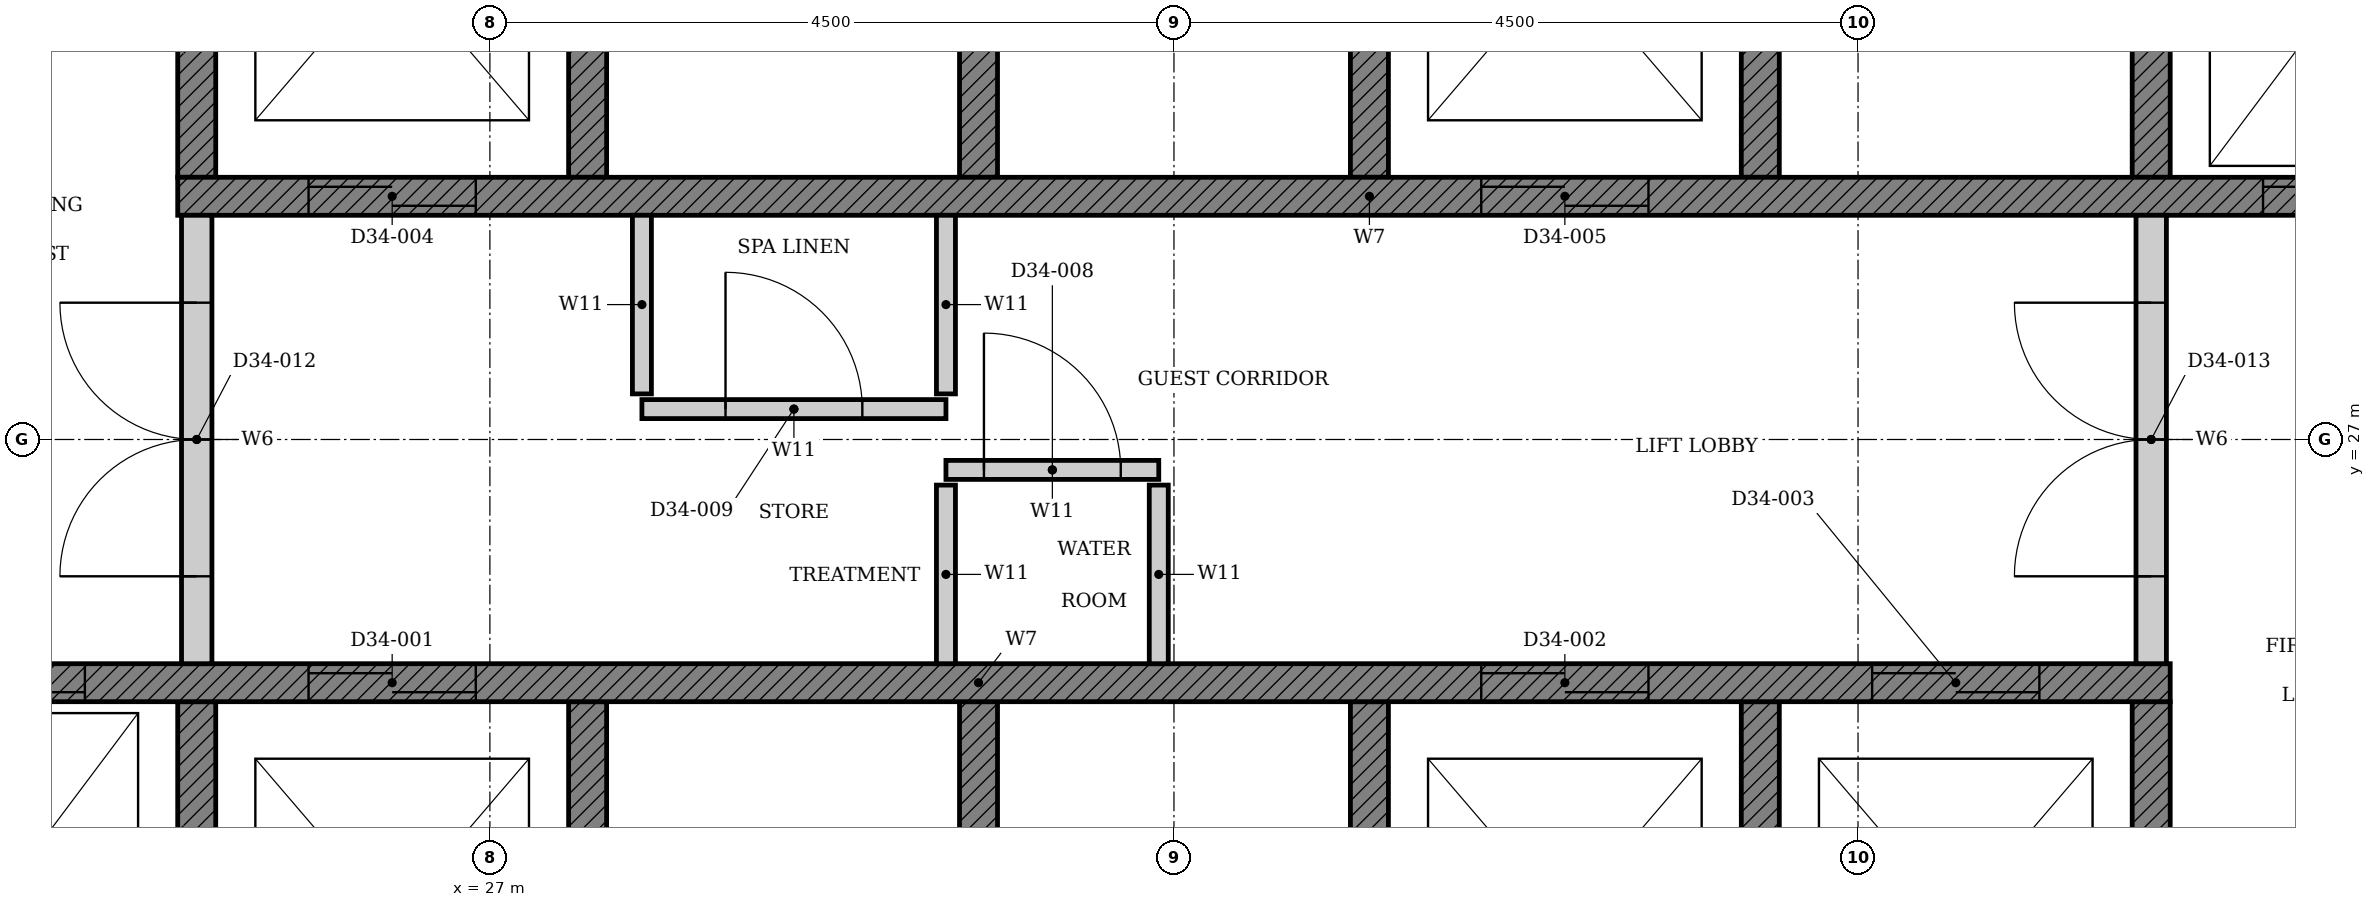
"""IFC4 building model, lengths in metres.
Left out: names, types, materials, properties, quantities, classifications, styles, units other than length and angle.
Written with IfcOpenShell. Run it as: python <this file> out.ifc"""

import sys

from ifc_helpers import new_model, si_unit, direction, frame, frame_2d, origin, place, context, subcontext, project, spatial, polyline, rectangle, outline, extrude, element, fill, save


model = new_model("IFC4")
c1 = context("Model", 3, precision=1e-05, world=origin(), true_north=direction((0.0, 1.0)))
c2 = subcontext(c1, "Body", "Model", "MODEL_VIEW")
j1 = project(units=[si_unit("LENGTHUNIT", "METRE"), si_unit("PLANEANGLEUNIT", "RADIAN")], contexts=[c1])
p1 = place(None, origin())
s1 = spatial("IfcSite", under=j1, at=p1, CompositionType="ELEMENT")
p2 = place(p1, origin())
s2 = spatial("IfcBuilding", under=s1, at=p2, CompositionType="ELEMENT")
p3 = place(p2, frame((0.0, 0.0, 136.8)))
s3 = spatial("IfcBuildingStorey", under=s2, at=p3, CompositionType="ELEMENT", Elevation=136.8)
p4 = place(p3, origin())
e1 = element("IfcWall", 1, at=p4, inside=s3, PredefinedType="SHEAR", context=c2, shape_type="SweptSolid", body=[
    extrude(outline(polyline([(22.375, 22.35), (38.053, 22.35), (38.053, 25.275), (37.803, 25.275), (37.803, 22.65), (35.482, 22.65), (35.482, 25.275), (35.232, 25.275), (35.232, 22.65), (32.911, 22.65), (32.911, 25.275), (32.661, 25.275), (32.661, 22.65), (30.339, 22.65), (30.339, 25.275), (30.089, 25.275), (30.089, 22.65), (27.768, 22.65), (27.768, 25.275), (27.518, 25.275), (27.518, 22.65), (25.197, 22.65), (25.197, 25.275), (24.947, 25.275), (24.947, 22.65), (22.625, 22.65), (22.625, 25.275), (22.375, 25.275), (22.375, 22.35)])), origin(), (0.0, 0.0, 1.0), 3.2),
])
p5 = place(p3, origin())
e2 = element("IfcWall", 2, at=p5, inside=s3, PredefinedType="SHEAR", context=c2, shape_type="SweptSolid", body=[
    extrude(outline(polyline([(24.947, 28.725), (25.197, 28.725), (25.197, 31.35), (27.518, 31.35), (27.518, 28.725), (27.768, 28.725), (27.768, 31.35), (30.089, 31.35), (30.089, 28.725), (30.339, 28.725), (30.339, 31.35), (32.661, 31.35), (32.661, 28.725), (32.911, 28.725), (32.911, 31.35), (35.232, 31.35), (35.232, 28.725), (35.482, 28.725), (35.482, 31.35), (37.803, 31.35), (37.803, 28.725), (38.053, 28.725), (38.053, 31.35), (40.375, 31.35), (40.375, 28.725), (40.625, 28.725), (40.625, 31.65), (24.947, 31.65), (24.947, 28.725)])), origin(), (0.0, 0.0, 1.0), 3.2),
])
p6 = place(p3, frame((22.375, 25.4, 0.0), z_axis=(0.0, 0.0, 1.0), x_axis=(1.0, 0.0, 0.0)))
e3 = element("IfcWall", 3, at=p6, inside=s3, PredefinedType="SHEAR", context=c2, shape_type="SweptSolid", body=[
    extrude(rectangle(XDim=15.678, YDim=0.25, at=frame_2d((7.839, 0.0))), origin(), (0.0, 0.0, 1.0), 3.2),
])
p7 = place(p6, frame((3.432, 0.0, 0.0)))
e4 = element("IfcOpeningElement", 4, at=p7, cuts=e3, PredefinedType="OPENING", context=c2, shape_type="SweptSolid", body=[
    extrude(rectangle(XDim=1.1, YDim=2.1, at=frame_2d((0.55, 1.05))), frame((0.0, 0.135, 0.0), z_axis=(0.0, -1.0, 0.0), x_axis=(1.0, 0.0, 0.0)), (0.0, 0.0, 1.0), 0.27),
])
p8 = place(p6, frame((11.146, 0.0, 0.0)))
e5 = element("IfcOpeningElement", 5, at=p8, cuts=e3, PredefinedType="OPENING", context=c2, shape_type="SweptSolid", body=[
    extrude(rectangle(XDim=1.1, YDim=2.1, at=frame_2d((0.55, 1.05))), frame((0.0, 0.135, 0.0), z_axis=(0.0, -1.0, 0.0), x_axis=(1.0, 0.0, 0.0)), (0.0, 0.0, 1.0), 0.27),
])
p9 = place(p6, frame((13.718, 0.0, 0.0)))
e6 = element("IfcOpeningElement", 6, at=p9, cuts=e3, PredefinedType="OPENING", context=c2, shape_type="SweptSolid", body=[
    extrude(rectangle(XDim=1.1, YDim=2.1, at=frame_2d((0.55, 1.05))), frame((0.0, 0.135, 0.0), z_axis=(0.0, -1.0, 0.0), x_axis=(1.0, 0.0, 0.0)), (0.0, 0.0, 1.0), 0.27),
])
p10 = place(p6, frame((0.861, 0.0, 0.0)))
e7 = element("IfcOpeningElement", 7, at=p10, cuts=e3, PredefinedType="OPENING", context=c2, shape_type="SweptSolid", body=[
    extrude(rectangle(XDim=1.1, YDim=2.1, at=frame_2d((0.55, 1.05))), frame((0.0, 0.135, 0.0), z_axis=(0.0, -1.0, 0.0), x_axis=(1.0, 0.0, 0.0)), (0.0, 0.0, 1.0), 0.27),
])
p11 = place(p3, frame((24.947, 28.6, 0.0), z_axis=(0.0, 0.0, 1.0), x_axis=(1.0, 0.0, 0.0)))
e8 = element("IfcWall", 8, at=p11, inside=s3, PredefinedType="SHEAR", context=c2, shape_type="SweptSolid", body=[
    extrude(rectangle(XDim=15.678, YDim=0.25, at=frame_2d((7.839, 0.0))), origin(), (0.0, 0.0, 1.0), 3.2),
])
p12 = place(p11, frame((0.861, 0.0, 0.0)))
e9 = element("IfcOpeningElement", 9, at=p12, cuts=e8, PredefinedType="OPENING", context=c2, shape_type="SweptSolid", body=[
    extrude(rectangle(XDim=1.1, YDim=2.1, at=frame_2d((0.55, 1.05))), frame((0.0, 0.135, 0.0), z_axis=(0.0, -1.0, 0.0), x_axis=(1.0, 0.0, 0.0)), (0.0, 0.0, 1.0), 0.27),
])
p13 = place(p11, frame((8.575, 0.0, 0.0)))
e10 = element("IfcOpeningElement", 10, at=p13, cuts=e8, PredefinedType="OPENING", context=c2, shape_type="SweptSolid", body=[
    extrude(rectangle(XDim=1.1, YDim=2.1, at=frame_2d((0.55, 1.05))), frame((0.0, 0.135, 0.0), z_axis=(0.0, -1.0, 0.0), x_axis=(1.0, 0.0, 0.0)), (0.0, 0.0, 1.0), 0.27),
])
p14 = place(p11, frame((13.718, 0.0, 0.0)))
e11 = element("IfcOpeningElement", 11, at=p14, cuts=e8, PredefinedType="OPENING", context=c2, shape_type="SweptSolid", body=[
    extrude(rectangle(XDim=1.1, YDim=2.1, at=frame_2d((0.55, 1.05))), frame((0.0, 0.135, 0.0), z_axis=(0.0, -1.0, 0.0), x_axis=(1.0, 0.0, 0.0)), (0.0, 0.0, 1.0), 0.27),
])
p15 = place(p3, frame((30.0, 26.8, 0.0), z_axis=(0.0, 0.0, 1.0), x_axis=(1.0, 0.0, 0.0)))
e12 = element("IfcWall", 12, at=p15, inside=s3, PredefinedType="PARTITIONING", context=c2, shape_type="SweptSolid", body=[
    extrude(rectangle(XDim=1.4, YDim=0.125, at=frame_2d((0.7, 0.0))), origin(), (0.0, 0.0, 1.0), 3.2),
])
p16 = place(p15, frame((0.25, 0.0, 0.0)))
e13 = element("IfcOpeningElement", 13, at=p16, cuts=e12, PredefinedType="OPENING", context=c2, shape_type="SweptSolid", body=[
    extrude(rectangle(XDim=0.9, YDim=2.1, at=frame_2d((0.45, 1.05))), frame((0.0, 0.073, 0.0), z_axis=(0.0, -1.0, 0.0), x_axis=(1.0, 0.0, 0.0)), (0.0, 0.0, 1.0), 0.145),
])
for number, where, z_axis, x_axis in (
    (14, (30.0, 25.525, 0.0), (0.0, 0.0, 1.0), (0.0, 1.0, 0.0)),
    (15, (31.4, 25.525, 0.0), (0.0, 0.0, 1.0), (0.0, 1.0, 0.0)),
):
    element("IfcWall", number, at=place(p3, frame(where, z_axis=z_axis, x_axis=x_axis)), inside=s3, PredefinedType="PARTITIONING", context=c2, shape_type="SweptSolid", body=[
        extrude(rectangle(XDim=1.175, YDim=0.125, at=frame_2d((0.587, 0.0))), origin(), (0.0, 0.0, 1.0), 3.2),
    ])
p17 = place(p3, frame((28.0, 27.2, 0.0), z_axis=(0.0, 0.0, 1.0), x_axis=(1.0, 0.0, 0.0)))
e16 = element("IfcWall", 16, at=p17, inside=s3, PredefinedType="PARTITIONING", context=c2, shape_type="SweptSolid", body=[
    extrude(rectangle(XDim=2.0, YDim=0.125, at=frame_2d((1.0, 0.0))), origin(), (0.0, 0.0, 1.0), 3.2),
])
p18 = place(p17, frame((0.55, 0.0, 0.0)))
e17 = element("IfcOpeningElement", 17, at=p18, cuts=e16, PredefinedType="OPENING", context=c2, shape_type="SweptSolid", body=[
    extrude(rectangle(XDim=0.9, YDim=2.1, at=frame_2d((0.45, 1.05))), frame((0.0, 0.073, 0.0), z_axis=(0.0, -1.0, 0.0), x_axis=(1.0, 0.0, 0.0)), (0.0, 0.0, 1.0), 0.145),
])
for number, where, z_axis, x_axis in (
    (18, (28.0, 28.475, 0.0), (0.0, 0.0, 1.0), (0.0, -1.0, 0.0)),
    (19, (30.0, 28.475, 0.0), (0.0, 0.0, 1.0), (0.0, -1.0, 0.0)),
):
    element("IfcWall", number, at=place(p3, frame(where, z_axis=z_axis, x_axis=x_axis)), inside=s3, PredefinedType="PARTITIONING", context=c2, shape_type="SweptSolid", body=[
        extrude(rectangle(XDim=1.175, YDim=0.125, at=frame_2d((0.587, 0.0))), origin(), (0.0, 0.0, 1.0), 3.2),
    ])
p19 = place(p3, frame((25.072, 25.525, 0.0), z_axis=(0.0, 0.0, 1.0), x_axis=(0.0, 1.0, 0.0)))
e20 = element("IfcWall", 20, at=p19, inside=s3, PredefinedType="PARTITIONING", context=c2, shape_type="SweptSolid", body=[
    extrude(rectangle(XDim=2.95, YDim=0.2, at=frame_2d((1.475, 0.0))), origin(), (0.0, 0.0, 1.0), 3.2),
])
p20 = place(p19, frame((0.575, 0.0, 0.0)))
e21 = element("IfcOpeningElement", 21, at=p20, cuts=e20, PredefinedType="OPENING", context=c2, shape_type="SweptSolid", body=[
    extrude(rectangle(XDim=1.8, YDim=2.1, at=frame_2d((0.9, 1.05))), frame((0.0, 0.11, 0.0), z_axis=(0.0, -1.0, 0.0), x_axis=(1.0, 0.0, 0.0)), (0.0, 0.0, 1.0), 0.22),
])
p21 = place(p3, frame((37.928, 25.525, 0.0), z_axis=(0.0, 0.0, 1.0), x_axis=(0.0, 1.0, 0.0)))
e22 = element("IfcWall", 22, at=p21, inside=s3, PredefinedType="PARTITIONING", context=c2, shape_type="SweptSolid", body=[
    extrude(rectangle(XDim=2.95, YDim=0.2, at=frame_2d((1.475, 0.0))), origin(), (0.0, 0.0, 1.0), 3.2),
])
p22 = place(p21, frame((0.575, 0.0, 0.0)))
e23 = element("IfcOpeningElement", 23, at=p22, cuts=e22, PredefinedType="OPENING", context=c2, shape_type="SweptSolid", body=[
    extrude(rectangle(XDim=1.8, YDim=2.1, at=frame_2d((0.9, 1.05))), frame((0.0, 0.11, 0.0), z_axis=(0.0, -1.0, 0.0), x_axis=(1.0, 0.0, 0.0)), (0.0, 0.0, 1.0), 0.22),
])
p23 = place(p7, origin())
e24 = element("IfcDoor", 24, at=p23, inside=s3, OperationType="DOUBLE_DOOR_SLIDING", PredefinedType="DOOR", context=c2, shape_type="SweptSolid", body=[
    extrude(rectangle(XDim=1.1, YDim=2.1, at=frame_2d((0.55, 1.05))), frame((0.0, 0.025, 0.0), z_axis=(0.0, -1.0, 0.0), x_axis=(1.0, 0.0, 0.0)), (0.0, 0.0, 1.0), 0.05),
])
fill(e4, e24)
p24 = place(p8, origin())
e25 = element("IfcDoor", 25, at=p24, inside=s3, OperationType="DOUBLE_DOOR_SLIDING", PredefinedType="DOOR", context=c2, shape_type="SweptSolid", body=[
    extrude(rectangle(XDim=1.1, YDim=2.1, at=frame_2d((0.55, 1.05))), frame((0.0, 0.025, 0.0), z_axis=(0.0, -1.0, 0.0), x_axis=(1.0, 0.0, 0.0)), (0.0, 0.0, 1.0), 0.05),
])
fill(e5, e25)
p25 = place(p9, origin())
e26 = element("IfcDoor", 26, at=p25, inside=s3, OperationType="DOUBLE_DOOR_SLIDING", PredefinedType="DOOR", context=c2, shape_type="SweptSolid", body=[
    extrude(rectangle(XDim=1.1, YDim=2.1, at=frame_2d((0.55, 1.05))), frame((0.0, 0.025, 0.0), z_axis=(0.0, -1.0, 0.0), x_axis=(1.0, 0.0, 0.0)), (0.0, 0.0, 1.0), 0.05),
])
fill(e6, e26)
p26 = place(p12, origin())
e27 = element("IfcDoor", 27, at=p26, inside=s3, OperationType="DOUBLE_DOOR_SLIDING", PredefinedType="DOOR", context=c2, shape_type="SweptSolid", body=[
    extrude(rectangle(XDim=1.1, YDim=2.1, at=frame_2d((0.55, 1.05))), frame((0.0, 0.025, 0.0), z_axis=(0.0, -1.0, 0.0), x_axis=(1.0, 0.0, 0.0)), (0.0, 0.0, 1.0), 0.05),
])
fill(e9, e27)
p27 = place(p13, origin())
e28 = element("IfcDoor", 28, at=p27, inside=s3, OperationType="DOUBLE_DOOR_SLIDING", PredefinedType="DOOR", context=c2, shape_type="SweptSolid", body=[
    extrude(rectangle(XDim=1.1, YDim=2.1, at=frame_2d((0.55, 1.05))), frame((0.0, 0.025, 0.0), z_axis=(0.0, -1.0, 0.0), x_axis=(1.0, 0.0, 0.0)), (0.0, 0.0, 1.0), 0.05),
])
fill(e10, e28)
p28 = place(p10, origin())
e29 = element("IfcDoor", 29, at=p28, inside=s3, OperationType="DOUBLE_DOOR_SLIDING", PredefinedType="DOOR", context=c2, shape_type="SweptSolid", body=[
    extrude(rectangle(XDim=1.1, YDim=2.1, at=frame_2d((0.55, 1.05))), frame((0.0, 0.025, 0.0), z_axis=(0.0, -1.0, 0.0), x_axis=(1.0, 0.0, 0.0)), (0.0, 0.0, 1.0), 0.05),
])
fill(e7, e29)
p29 = place(p14, origin())
e30 = element("IfcDoor", 30, at=p29, inside=s3, OperationType="DOUBLE_DOOR_SLIDING", PredefinedType="DOOR", context=c2, shape_type="SweptSolid", body=[
    extrude(rectangle(XDim=1.1, YDim=2.1, at=frame_2d((0.55, 1.05))), frame((0.0, 0.025, 0.0), z_axis=(0.0, -1.0, 0.0), x_axis=(1.0, 0.0, 0.0)), (0.0, 0.0, 1.0), 0.05),
])
fill(e11, e30)
p30 = place(p16, origin())
e31 = element("IfcDoor", 31, at=p30, inside=s3, OperationType="SINGLE_SWING_LEFT", PredefinedType="DOOR", context=c2, shape_type="SweptSolid", body=[
    extrude(rectangle(XDim=0.9, YDim=2.1, at=frame_2d((0.45, 1.05))), frame((0.0, 0.025, 0.0), z_axis=(0.0, -1.0, 0.0), x_axis=(1.0, 0.0, 0.0)), (0.0, 0.0, 1.0), 0.05),
])
fill(e13, e31)
p31 = place(p18, origin())
e32 = element("IfcDoor", 32, at=p31, inside=s3, OperationType="SINGLE_SWING_LEFT", PredefinedType="DOOR", context=c2, shape_type="SweptSolid", body=[
    extrude(rectangle(XDim=0.9, YDim=2.1, at=frame_2d((0.45, 1.05))), frame((0.0, 0.025, 0.0), z_axis=(0.0, -1.0, 0.0), x_axis=(1.0, 0.0, 0.0)), (0.0, 0.0, 1.0), 0.05),
])
fill(e17, e32)
p32 = place(p20, origin())
e33 = element("IfcDoor", 33, at=p32, inside=s3, OperationType="DOUBLE_DOOR_SINGLE_SWING", PredefinedType="DOOR", context=c2, shape_type="SweptSolid", body=[
    extrude(rectangle(XDim=1.8, YDim=2.1, at=frame_2d((0.9, 1.05))), frame((0.0, 0.025, 0.0), z_axis=(0.0, -1.0, 0.0), x_axis=(1.0, 0.0, 0.0)), (0.0, 0.0, 1.0), 0.05),
])
fill(e21, e33)
p33 = place(p22, origin())
e34 = element("IfcDoor", 34, at=p33, inside=s3, OperationType="DOUBLE_DOOR_SINGLE_SWING", PredefinedType="DOOR", context=c2, shape_type="SweptSolid", body=[
    extrude(rectangle(XDim=1.8, YDim=2.1, at=frame_2d((0.9, 1.05))), frame((0.0, 0.025, 0.0), z_axis=(0.0, -1.0, 0.0), x_axis=(1.0, 0.0, 0.0)), (0.0, 0.0, 1.0), 0.05),
])
fill(e23, e34)
save(model, sys.argv[1])
